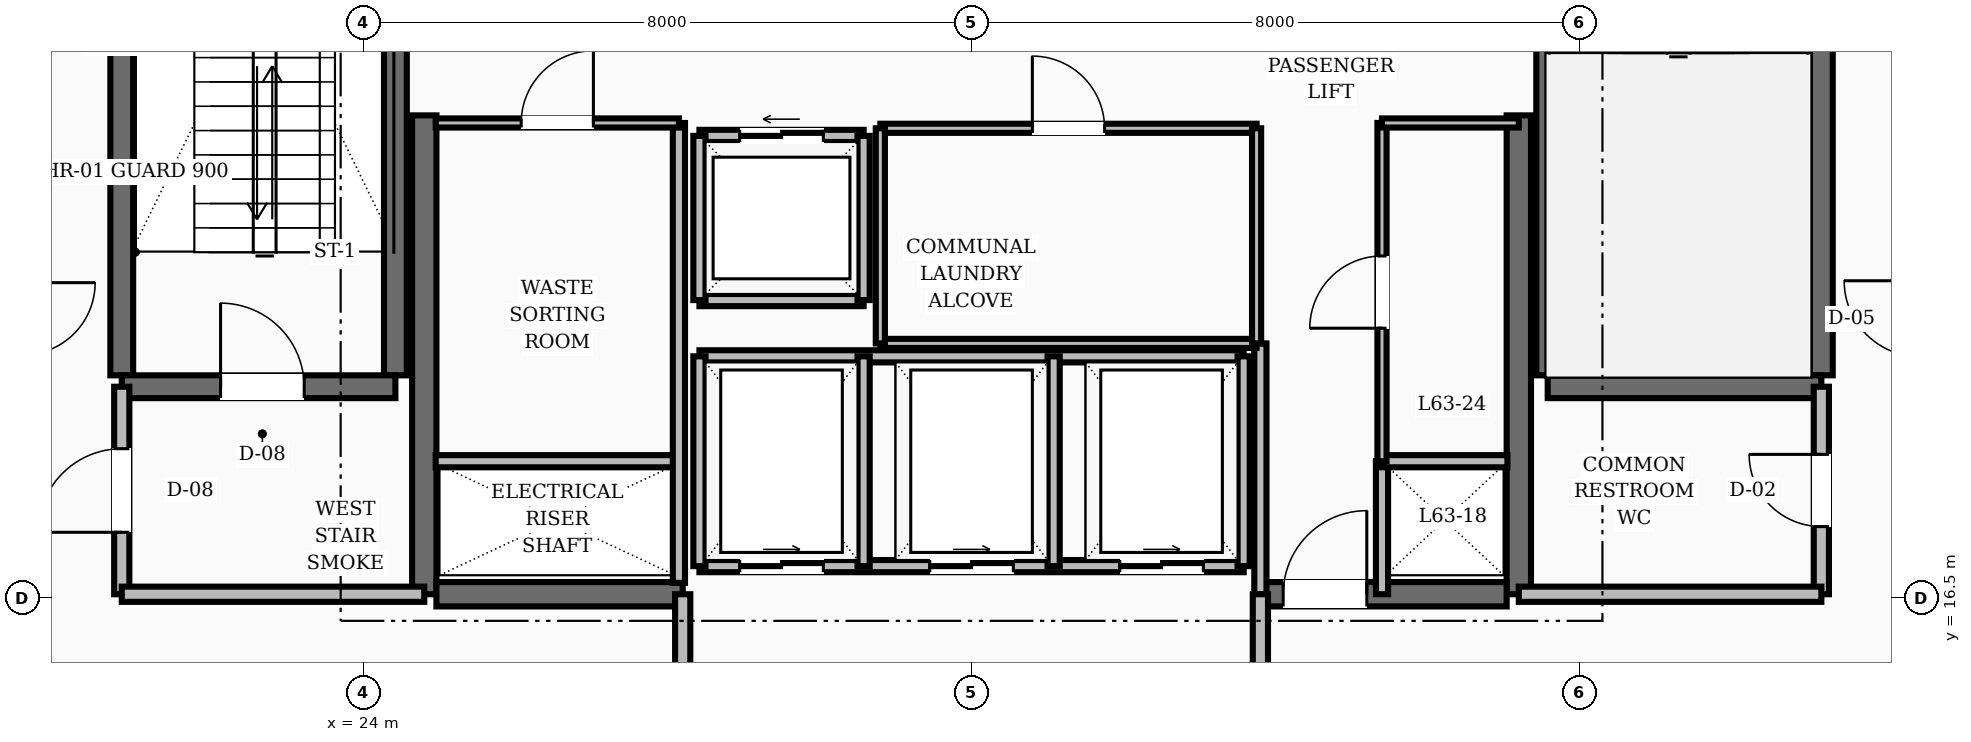
"""IFC4 building model, lengths in metres.
Left out: names, types, materials, properties, quantities, classifications, styles, units other than length and angle.
Written with IfcOpenShell. Run it as: python <this file> out.ifc"""

import sys

from ifc_helpers import new_model, si_unit, direction, frame, frame_2d, origin, place, context, subcontext, project, spatial, rectangle, extrude, element, fill, save


model = new_model("IFC4")
c1 = context("Model", 3, precision=1e-05, world=origin(), true_north=direction((0.0, 1.0)))
c2 = subcontext(c1, "Body", "Model", "MODEL_VIEW")
j1 = project(units=[si_unit("LENGTHUNIT", "METRE"), si_unit("PLANEANGLEUNIT", "RADIAN")], contexts=[c1])
p1 = place(None, origin())
s1 = spatial("IfcSite", under=j1, at=p1, CompositionType="ELEMENT")
p2 = place(p1, origin())
s2 = spatial("IfcBuilding", under=s1, at=p2, CompositionType="ELEMENT")
p3 = place(p2, frame((0.0, 0.0, 243.6)))
s3 = spatial("IfcBuildingStorey", under=s2, at=p3, CompositionType="ELEMENT", Elevation=243.6)
for number, where, z_axis, x_axis in (
    (1, (24.8, 16.55, 0.0), (0.0, 0.0, 1.0), (0.0, 1.0, 0.0)),
    (2, (39.2, 16.55, 0.0), (0.0, 0.0, 1.0), (0.0, 1.0, 0.0)),
):
    element("IfcWall", number, at=place(p3, frame(where, z_axis=z_axis, x_axis=x_axis)), inside=s3, PredefinedType="SHEAR", context=c2, shape_type="SweptSolid", body=[
        extrude(rectangle(XDim=6.3, YDim=0.32, at=frame_2d((3.15, 0.0))), origin(), (0.0, 0.0, 1.0), 3.6),
    ])
p4 = place(p3, frame((24.96, 16.55, 0.0), z_axis=(0.0, 0.0, 1.0), x_axis=(1.0, 0.0, 0.0)))
e3 = element("IfcWall", 3, at=p4, inside=s3, PredefinedType="SHEAR", context=c2, shape_type="SweptSolid", body=[
    extrude(rectangle(XDim=3.24, YDim=0.32, at=frame_2d((1.62, 0.0))), origin(), (0.0, 0.0, 1.0), 3.6),
])
p5 = place(p3, frame((35.8, 16.55, 0.0), z_axis=(0.0, 0.0, 1.0), x_axis=(1.0, 0.0, 0.0)))
e4 = element("IfcWall", 4, at=p5, inside=s3, PredefinedType="SHEAR", context=c2, shape_type="SweptSolid", body=[
    extrude(rectangle(XDim=3.24, YDim=0.32, at=frame_2d((1.62, 0.0))), origin(), (0.0, 0.0, 1.0), 3.6),
])
p6 = place(p5, frame((0.3, 0.0, 0.0)))
e5 = element("IfcOpeningElement", 5, at=p6, cuts=e4, PredefinedType="OPENING", context=c2, shape_type="SweptSolid", body=[
    extrude(rectangle(XDim=1.1, YDim=2.1, at=frame_2d((0.55, 1.05))), frame((0.0, 0.17, 0.0), z_axis=(0.0, -1.0, 0.0), x_axis=(1.0, 0.0, 0.0)), (0.0, 0.0, 1.0), 0.34),
])
for number, where, z_axis, x_axis in (
    (6, (20.82, 19.43, 0.0), (0.0, 0.0, 1.0), (0.0, 1.0, 0.0)),
    (7, (24.42, 19.43, 0.0), (0.0, 0.0, 1.0), (0.0, 1.0, 0.0)),
):
    element("IfcWall", number, at=place(p3, frame(where, z_axis=z_axis, x_axis=x_axis)), inside=s3, PredefinedType="SHEAR", context=c2, shape_type="SweptSolid", body=[
        extrude(rectangle(XDim=8.74, YDim=0.3, at=frame_2d((4.37, 0.0))), origin(), (0.0, 0.0, 1.0), 3.6),
    ])
p7 = place(p3, frame((20.82, 19.28, 0.0), z_axis=(0.0, 0.0, 1.0), x_axis=(1.0, 0.0, 0.0)))
e8 = element("IfcWall", 8, at=p7, inside=s3, PredefinedType="SHEAR", context=c2, shape_type="SweptSolid", body=[
    extrude(rectangle(XDim=3.6, YDim=0.3, at=frame_2d((1.8, 0.0))), origin(), (0.0, 0.0, 1.0), 3.6),
])
p8 = place(p7, frame((1.3, 0.0, 0.0)))
e9 = element("IfcOpeningElement", 9, at=p8, cuts=e8, PredefinedType="OPENING", context=c2, shape_type="SweptSolid", body=[
    extrude(rectangle(XDim=1.1, YDim=2.1, at=frame_2d((0.55, 1.05))), frame((0.0, 0.16, 0.0), z_axis=(0.0, -1.0, 0.0), x_axis=(1.0, 0.0, 0.0)), (0.0, 0.0, 1.0), 0.32),
])
for number, where, z_axis, x_axis in (
    (10, (43.18, 19.43, 0.0), (0.0, 0.0, 1.0), (0.0, 1.0, 0.0)),
    (11, (39.58, 19.43, 0.0), (0.0, 0.0, 1.0), (0.0, 1.0, 0.0)),
):
    element("IfcWall", number, at=place(p3, frame(where, z_axis=z_axis, x_axis=x_axis)), inside=s3, PredefinedType="SHEAR", context=c2, shape_type="SweptSolid", body=[
        extrude(rectangle(XDim=8.74, YDim=0.3, at=frame_2d((4.37, 0.0))), origin(), (0.0, 0.0, 1.0), 3.6),
    ])
p9 = place(p3, frame((39.58, 19.28, 0.0), z_axis=(0.0, 0.0, 1.0), x_axis=(1.0, 0.0, 0.0)))
e12 = element("IfcWall", 12, at=p9, inside=s3, PredefinedType="SHEAR", context=c2, shape_type="SweptSolid", body=[
    extrude(rectangle(XDim=3.6, YDim=0.3, at=frame_2d((1.8, 0.0))), origin(), (0.0, 0.0, 1.0), 3.6),
])
p10 = place(p3, frame((20.82, 16.55, 0.0), z_axis=(0.0, 0.0, 1.0), x_axis=(0.0, 1.0, 0.0)))
e13 = element("IfcWall", 13, at=p10, inside=s3, PredefinedType="SOLIDWALL", context=c2, shape_type="SweptSolid", body=[
    extrude(rectangle(XDim=2.73, YDim=0.2, at=frame_2d((1.365, 0.0))), origin(), (0.0, 0.0, 1.0), 2.87),
])
p11 = place(p10, frame((0.815, 0.0, 0.0)))
e14 = element("IfcOpeningElement", 14, at=p11, cuts=e13, PredefinedType="OPENING", context=c2, shape_type="SweptSolid", body=[
    extrude(rectangle(XDim=1.1, YDim=2.1, at=frame_2d((0.55, 1.05))), frame((0.0, 0.11, 0.0), z_axis=(0.0, -1.0, 0.0), x_axis=(1.0, 0.0, 0.0)), (0.0, 0.0, 1.0), 0.22),
])
p12 = place(p3, frame((20.82, 16.55, 0.0), z_axis=(0.0, 0.0, 1.0), x_axis=(1.0, 0.0, 0.0)))
e15 = element("IfcWall", 15, at=p12, inside=s3, PredefinedType="SOLIDWALL", context=c2, shape_type="SweptSolid", body=[
    extrude(rectangle(XDim=3.98, YDim=0.2, at=frame_2d((1.99, 0.0))), origin(), (0.0, 0.0, 1.0), 2.87),
])
p13 = place(p3, frame((43.18, 16.55, 0.0), z_axis=(0.0, 0.0, 1.0), x_axis=(0.0, 1.0, 0.0)))
e16 = element("IfcWall", 16, at=p13, inside=s3, PredefinedType="SOLIDWALL", context=c2, shape_type="SweptSolid", body=[
    extrude(rectangle(XDim=2.73, YDim=0.2, at=frame_2d((1.365, 0.0))), origin(), (0.0, 0.0, 1.0), 2.87),
])
p14 = place(p13, frame((0.89, 0.0, 0.0)))
e17 = element("IfcOpeningElement", 17, at=p14, cuts=e16, PredefinedType="OPENING", context=c2, shape_type="SweptSolid", body=[
    extrude(rectangle(XDim=0.95, YDim=2.1, at=frame_2d((0.475, 1.05))), frame((0.0, 0.11, 0.0), z_axis=(0.0, -1.0, 0.0), x_axis=(1.0, 0.0, 0.0)), (0.0, 0.0, 1.0), 0.22),
])
p15 = place(p3, frame((39.2, 16.55, 0.0), z_axis=(0.0, 0.0, 1.0), x_axis=(1.0, 0.0, 0.0)))
e18 = element("IfcWall", 18, at=p15, inside=s3, PredefinedType="SOLIDWALL", context=c2, shape_type="SweptSolid", body=[
    extrude(rectangle(XDim=3.98, YDim=0.2, at=frame_2d((1.99, 0.0))), origin(), (0.0, 0.0, 1.0), 2.87),
])
p16 = place(p3, frame((35.8, 16.55, 0.0), z_axis=(0.0, 0.0, 1.0), x_axis=(0.0, 1.0, 0.0)))
e19 = element("IfcWall", 19, at=p16, inside=s3, PredefinedType="SOLIDWALL", context=c2, shape_type="SweptSolid", body=[
    extrude(rectangle(XDim=3.3, YDim=0.16, at=frame_2d((1.65, 0.0))), origin(), (0.0, 0.0, 1.0), 2.87),
])
p17 = place(p3, frame((37.4, 16.55, 0.0), z_axis=(0.0, 0.0, 1.0), x_axis=(0.0, 1.0, 0.0)))
e20 = element("IfcWall", 20, at=p17, inside=s3, PredefinedType="SOLIDWALL", context=c2, shape_type="SweptSolid", body=[
    extrude(rectangle(XDim=1.75, YDim=0.16, at=frame_2d((0.875, 0.0))), origin(), (0.0, 0.0, 1.0), 2.87),
])
for number, where, z_axis, x_axis in (
    (21, (28.2, 14.35, 0.0), (0.0, 0.0, 1.0), (0.0, 1.0, 0.0)),
    (22, (35.8, 14.35, 0.0), (0.0, 0.0, 1.0), (0.0, 1.0, 0.0)),
):
    element("IfcWall", number, at=place(p3, frame(where, z_axis=z_axis, x_axis=x_axis)), inside=s3, PredefinedType="SOLIDWALL", context=c2, shape_type="SweptSolid", body=[
        extrude(rectangle(XDim=2.2, YDim=0.2, at=frame_2d((1.1, 0.0))), origin(), (0.0, 0.0, 1.0), 2.87),
    ])
p18 = place(p3, frame((28.42, 22.58, 0.0), z_axis=(0.0, 0.0, 1.0), x_axis=(1.0, 0.0, 0.0)))
e23 = element("IfcWall", 23, at=p18, inside=s3, PredefinedType="SOLIDWALL", context=c2, shape_type="SweptSolid", body=[
    extrude(rectangle(XDim=2.16, YDim=0.16, at=frame_2d((1.08, 0.0))), origin(), (0.0, 0.0, 1.0), 2.87),
])
p19 = place(p18, frame((0.53, 0.0, 0.0)))
e24 = element("IfcOpeningElement", 24, at=p19, cuts=e23, PredefinedType="OPENING", context=c2, shape_type="SweptSolid", body=[
    extrude(rectangle(XDim=1.1, YDim=2.15, at=frame_2d((0.55, 1.075))), frame((0.0, 0.09, 0.0), z_axis=(0.0, -1.0, 0.0), x_axis=(1.0, 0.0, 0.0)), (0.0, 0.0, 1.0), 0.18),
])
for number, where, z_axis, x_axis in (
    (25, (28.42, 20.42, 0.0), (0.0, 0.0, 1.0), (1.0, 0.0, 0.0)),
    (26, (28.42, 20.42, 0.0), (0.0, 0.0, 1.0), (0.0, 1.0, 0.0)),
    (27, (30.58, 20.42, 0.0), (0.0, 0.0, 1.0), (0.0, 1.0, 0.0)),
):
    element("IfcWall", number, at=place(p3, frame(where, z_axis=z_axis, x_axis=x_axis)), inside=s3, PredefinedType="SOLIDWALL", context=c2, shape_type="SweptSolid", body=[
        extrude(rectangle(XDim=2.16, YDim=0.16, at=frame_2d((1.08, 0.0))), origin(), (0.0, 0.0, 1.0), 2.87),
    ])
p20 = place(p3, frame((28.42, 16.92, 0.0), z_axis=(0.0, 0.0, 1.0), x_axis=(1.0, 0.0, 0.0)))
e28 = element("IfcWall", 28, at=p20, inside=s3, PredefinedType="SOLIDWALL", context=c2, shape_type="SweptSolid", body=[
    extrude(rectangle(XDim=7.16, YDim=0.16, at=frame_2d((3.58, 0.0))), origin(), (0.0, 0.0, 1.0), 2.87),
])
p21 = place(p20, frame((0.53, 0.0, 0.0)))
e29 = element("IfcOpeningElement", 29, at=p21, cuts=e28, PredefinedType="OPENING", context=c2, shape_type="SweptSolid", body=[
    extrude(rectangle(XDim=1.1, YDim=2.15, at=frame_2d((0.55, 1.075))), frame((0.0, 0.09, 0.0), z_axis=(0.0, -1.0, 0.0), x_axis=(1.0, 0.0, 0.0)), (0.0, 0.0, 1.0), 0.18),
])
p22 = place(p20, frame((3.03, 0.0, 0.0)))
e30 = element("IfcOpeningElement", 30, at=p22, cuts=e28, PredefinedType="OPENING", context=c2, shape_type="SweptSolid", body=[
    extrude(rectangle(XDim=1.1, YDim=2.15, at=frame_2d((0.55, 1.075))), frame((0.0, 0.09, 0.0), z_axis=(0.0, -1.0, 0.0), x_axis=(1.0, 0.0, 0.0)), (0.0, 0.0, 1.0), 0.18),
])
p23 = place(p20, frame((5.53, 0.0, 0.0)))
e31 = element("IfcOpeningElement", 31, at=p23, cuts=e28, PredefinedType="OPENING", context=c2, shape_type="SweptSolid", body=[
    extrude(rectangle(XDim=1.1, YDim=2.15, at=frame_2d((0.55, 1.075))), frame((0.0, 0.09, 0.0), z_axis=(0.0, -1.0, 0.0), x_axis=(1.0, 0.0, 0.0)), (0.0, 0.0, 1.0), 0.18),
])
p24 = place(p3, frame((28.42, 19.68, 0.0), z_axis=(0.0, 0.0, 1.0), x_axis=(1.0, 0.0, 0.0)))
e32 = element("IfcWall", 32, at=p24, inside=s3, PredefinedType="SOLIDWALL", context=c2, shape_type="SweptSolid", body=[
    extrude(rectangle(XDim=7.16, YDim=0.16, at=frame_2d((3.58, 0.0))), origin(), (0.0, 0.0, 1.0), 2.87),
])
for number, where, z_axis, x_axis in (
    (33, (28.42, 16.92, 0.0), (0.0, 0.0, 1.0), (0.0, 1.0, 0.0)),
    (34, (30.58, 16.92, 0.0), (0.0, 0.0, 1.0), (0.0, 1.0, 0.0)),
    (35, (33.08, 16.92, 0.0), (0.0, 0.0, 1.0), (0.0, 1.0, 0.0)),
    (36, (35.58, 16.92, 0.0), (0.0, 0.0, 1.0), (0.0, 1.0, 0.0)),
):
    element("IfcWall", number, at=place(p3, frame(where, z_axis=z_axis, x_axis=x_axis)), inside=s3, PredefinedType="SOLIDWALL", context=c2, shape_type="SweptSolid", body=[
        extrude(rectangle(XDim=2.76, YDim=0.16, at=frame_2d((1.38, 0.0))), origin(), (0.0, 0.0, 1.0), 2.87),
    ])
p25 = place(p3, frame((30.8, 22.68, 0.0), z_axis=(0.0, 0.0, 1.0), x_axis=(1.0, 0.0, 0.0)))
e37 = element("IfcWall", 37, at=p25, inside=s3, PredefinedType="PARTITIONING", context=c2, shape_type="SweptSolid", body=[
    extrude(rectangle(XDim=4.95, YDim=0.12, at=frame_2d((2.475, 0.0))), origin(), (0.0, 0.0, 1.0), 2.87),
])
p26 = place(p25, frame((2.0, 0.0, 0.0)))
e38 = element("IfcOpeningElement", 38, at=p26, cuts=e37, PredefinedType="OPENING", context=c2, shape_type="SweptSolid", body=[
    extrude(rectangle(XDim=0.95, YDim=2.1, at=frame_2d((0.475, 1.05))), frame((0.0, 0.07, 0.0), z_axis=(0.0, -1.0, 0.0), x_axis=(1.0, 0.0, 0.0)), (0.0, 0.0, 1.0), 0.14),
])
p27 = place(p3, frame((30.8, 19.85, 0.0), z_axis=(0.0, 0.0, 1.0), x_axis=(1.0, 0.0, 0.0)))
e39 = element("IfcWall", 39, at=p27, inside=s3, PredefinedType="PARTITIONING", context=c2, shape_type="SweptSolid", body=[
    extrude(rectangle(XDim=4.95, YDim=0.12, at=frame_2d((2.475, 0.0))), origin(), (0.0, 0.0, 1.0), 2.87),
])
for number, where, z_axis, x_axis in (
    (40, (30.8, 19.85, 0.0), (0.0, 0.0, 1.0), (0.0, 1.0, 0.0)),
    (41, (35.75, 19.85, 0.0), (0.0, 0.0, 1.0), (0.0, 1.0, 0.0)),
):
    element("IfcWall", number, at=place(p3, frame(where, z_axis=z_axis, x_axis=x_axis)), inside=s3, PredefinedType="PARTITIONING", context=c2, shape_type="SweptSolid", body=[
        extrude(rectangle(XDim=2.83, YDim=0.12, at=frame_2d((1.415, 0.0))), origin(), (0.0, 0.0, 1.0), 2.87),
    ])
p28 = place(p3, frame((24.95, 18.3, 0.0), z_axis=(0.0, 0.0, 1.0), x_axis=(1.0, 0.0, 0.0)))
e42 = element("IfcWall", 42, at=p28, inside=s3, PredefinedType="SOLIDWALL", context=c2, shape_type="SweptSolid", body=[
    extrude(rectangle(XDim=3.2, YDim=0.16, at=frame_2d((1.6, 0.0))), origin(), (0.0, 0.0, 1.0), 2.87),
])
p29 = place(p3, frame((28.15, 16.7, 0.0), z_axis=(0.0, 0.0, 1.0), x_axis=(0.0, 1.0, 0.0)))
e43 = element("IfcWall", 43, at=p29, inside=s3, PredefinedType="SOLIDWALL", context=c2, shape_type="SweptSolid", body=[
    extrude(rectangle(XDim=6.05, YDim=0.16, at=frame_2d((3.025, 0.0))), origin(), (0.0, 0.0, 1.0), 2.87),
])
p30 = place(p3, frame((37.4, 18.3, 0.0), z_axis=(0.0, 0.0, 1.0), x_axis=(1.0, 0.0, 0.0)))
e44 = element("IfcWall", 44, at=p30, inside=s3, PredefinedType="SOLIDWALL", context=c2, shape_type="SweptSolid", body=[
    extrude(rectangle(XDim=1.65, YDim=0.16, at=frame_2d((0.825, 0.0))), origin(), (0.0, 0.0, 1.0), 2.87),
])
p31 = place(p3, frame((24.95, 22.75, 0.0), z_axis=(0.0, 0.0, 1.0), x_axis=(1.0, 0.0, 0.0)))
e45 = element("IfcWall", 45, at=p31, inside=s3, PredefinedType="PARTITIONING", context=c2, shape_type="SweptSolid", body=[
    extrude(rectangle(XDim=3.2, YDim=0.12, at=frame_2d((1.6, 0.0))), origin(), (0.0, 0.0, 1.0), 2.87),
])
p32 = place(p31, frame((1.125, 0.0, 0.0)))
e46 = element("IfcOpeningElement", 46, at=p32, cuts=e45, PredefinedType="OPENING", context=c2, shape_type="SweptSolid", body=[
    extrude(rectangle(XDim=0.95, YDim=2.1, at=frame_2d((0.475, 1.05))), frame((0.0, 0.07, 0.0), z_axis=(0.0, -1.0, 0.0), x_axis=(1.0, 0.0, 0.0)), (0.0, 0.0, 1.0), 0.14),
])
p33 = place(p3, frame((37.4, 18.3, 0.0), z_axis=(0.0, 0.0, 1.0), x_axis=(0.0, 1.0, 0.0)))
e47 = element("IfcWall", 47, at=p33, inside=s3, PredefinedType="PARTITIONING", context=c2, shape_type="SweptSolid", body=[
    extrude(rectangle(XDim=4.45, YDim=0.12, at=frame_2d((2.225, 0.0))), origin(), (0.0, 0.0, 1.0), 2.87),
])
p34 = place(p33, frame((1.75, 0.0, 0.0)))
e48 = element("IfcOpeningElement", 48, at=p34, cuts=e47, PredefinedType="OPENING", context=c2, shape_type="SweptSolid", body=[
    extrude(rectangle(XDim=0.95, YDim=2.1, at=frame_2d((0.475, 1.05))), frame((0.0, 0.07, 0.0), z_axis=(0.0, -1.0, 0.0), x_axis=(1.0, 0.0, 0.0)), (0.0, 0.0, 1.0), 0.14),
])
p35 = place(p3, frame((37.4, 22.75, 0.0), z_axis=(0.0, 0.0, 1.0), x_axis=(1.0, 0.0, 0.0)))
e49 = element("IfcWall", 49, at=p35, inside=s3, PredefinedType="PARTITIONING", context=c2, shape_type="SweptSolid", body=[
    extrude(rectangle(XDim=1.8, YDim=0.12, at=frame_2d((0.9, 0.0))), origin(), (0.0, 0.0, 1.0), 2.87),
])
for number, where, z_axis, x_axis in (
    (50, (19.573, 15.697, 0.0), (0.0, 0.0, 1.0), (0.707, -0.707, 0.0)),
    (51, (42.365, 13.635, 0.0), (0.0, 0.0, 1.0), (0.707, 0.707, 0.0)),
):
    element("IfcWall", number, at=place(p3, frame(where, z_axis=z_axis, x_axis=x_axis)), inside=s3, PredefinedType="SOLIDWALL", context=c2, shape_type="SweptSolid", body=[
        extrude(rectangle(XDim=2.916, YDim=0.16, at=frame_2d((1.458, 0.0))), origin(), (0.0, 0.0, 1.0), 2.87),
    ])
p36 = place(p8, origin())
e52 = element("IfcDoor", 52, at=p36, inside=s3, OperationType="SINGLE_SWING_LEFT", PredefinedType="DOOR", context=c2, shape_type="SweptSolid", body=[
    extrude(rectangle(XDim=1.1, YDim=2.1, at=frame_2d((0.55, 1.05))), frame((0.0, 0.025, 0.0), z_axis=(0.0, -1.0, 0.0), x_axis=(1.0, 0.0, 0.0)), (0.0, 0.0, 1.0), 0.05),
])
fill(e9, e52)
p37 = place(p11, origin())
e53 = element("IfcDoor", 53, at=p37, inside=s3, OperationType="SINGLE_SWING_LEFT", PredefinedType="DOOR", context=c2, shape_type="SweptSolid", body=[
    extrude(rectangle(XDim=1.1, YDim=2.1, at=frame_2d((0.55, 1.05))), frame((0.0, 0.025, 0.0), z_axis=(0.0, -1.0, 0.0), x_axis=(1.0, 0.0, 0.0)), (0.0, 0.0, 1.0), 0.05),
])
fill(e14, e53)
p38 = place(p14, origin())
e54 = element("IfcDoor", 54, at=p38, inside=s3, OperationType="SINGLE_SWING_RIGHT", PredefinedType="DOOR", context=c2, shape_type="SweptSolid", body=[
    extrude(rectangle(XDim=0.95, YDim=2.1, at=frame_2d((0.475, 1.05))), frame((0.0, 0.025, 0.0), z_axis=(0.0, -1.0, 0.0), x_axis=(1.0, 0.0, 0.0)), (0.0, 0.0, 1.0), 0.05),
])
fill(e17, e54)
p39 = place(p6, origin())
e55 = element("IfcDoor", 55, at=p39, inside=s3, OperationType="SINGLE_SWING_RIGHT", PredefinedType="DOOR", context=c2, shape_type="SweptSolid", body=[
    extrude(rectangle(XDim=1.1, YDim=2.1, at=frame_2d((0.55, 1.05))), frame((0.0, 0.025, 0.0), z_axis=(0.0, -1.0, 0.0), x_axis=(1.0, 0.0, 0.0)), (0.0, 0.0, 1.0), 0.05),
])
fill(e5, e55)
p40 = place(p19, origin())
e56 = element("IfcDoor", 56, at=p40, inside=s3, OperationType="SLIDING_TO_LEFT", PredefinedType="DOOR", context=c2, shape_type="SweptSolid", body=[
    extrude(rectangle(XDim=1.1, YDim=2.15, at=frame_2d((0.55, 1.075))), frame((0.0, 0.025, 0.0), z_axis=(0.0, -1.0, 0.0), x_axis=(1.0, 0.0, 0.0)), (0.0, 0.0, 1.0), 0.05),
])
fill(e24, e56)
p41 = place(p21, origin())
e57 = element("IfcDoor", 57, at=p41, inside=s3, OperationType="SLIDING_TO_RIGHT", PredefinedType="DOOR", context=c2, shape_type="SweptSolid", body=[
    extrude(rectangle(XDim=1.1, YDim=2.15, at=frame_2d((0.55, 1.075))), frame((0.0, 0.025, 0.0), z_axis=(0.0, -1.0, 0.0), x_axis=(1.0, 0.0, 0.0)), (0.0, 0.0, 1.0), 0.05),
])
fill(e29, e57)
p42 = place(p22, origin())
e58 = element("IfcDoor", 58, at=p42, inside=s3, OperationType="SLIDING_TO_RIGHT", PredefinedType="DOOR", context=c2, shape_type="SweptSolid", body=[
    extrude(rectangle(XDim=1.1, YDim=2.15, at=frame_2d((0.55, 1.075))), frame((0.0, 0.025, 0.0), z_axis=(0.0, -1.0, 0.0), x_axis=(1.0, 0.0, 0.0)), (0.0, 0.0, 1.0), 0.05),
])
fill(e30, e58)
p43 = place(p23, origin())
e59 = element("IfcDoor", 59, at=p43, inside=s3, OperationType="SLIDING_TO_RIGHT", PredefinedType="DOOR", context=c2, shape_type="SweptSolid", body=[
    extrude(rectangle(XDim=1.1, YDim=2.15, at=frame_2d((0.55, 1.075))), frame((0.0, 0.025, 0.0), z_axis=(0.0, -1.0, 0.0), x_axis=(1.0, 0.0, 0.0)), (0.0, 0.0, 1.0), 0.05),
])
fill(e31, e59)
p44 = place(p26, origin())
e60 = element("IfcDoor", 60, at=p44, inside=s3, OperationType="SINGLE_SWING_LEFT", PredefinedType="DOOR", context=c2, shape_type="SweptSolid", body=[
    extrude(rectangle(XDim=0.95, YDim=2.1, at=frame_2d((0.475, 1.05))), frame((0.0, 0.025, 0.0), z_axis=(0.0, -1.0, 0.0), x_axis=(1.0, 0.0, 0.0)), (0.0, 0.0, 1.0), 0.05),
])
fill(e38, e60)
p45 = place(p32, origin())
e61 = element("IfcDoor", 61, at=p45, inside=s3, OperationType="SINGLE_SWING_RIGHT", PredefinedType="DOOR", context=c2, shape_type="SweptSolid", body=[
    extrude(rectangle(XDim=0.95, YDim=2.1, at=frame_2d((0.475, 1.05))), frame((0.0, 0.025, 0.0), z_axis=(0.0, -1.0, 0.0), x_axis=(1.0, 0.0, 0.0)), (0.0, 0.0, 1.0), 0.05),
])
fill(e46, e61)
p46 = place(p34, origin())
e62 = element("IfcDoor", 62, at=p46, inside=s3, OperationType="SINGLE_SWING_LEFT", PredefinedType="DOOR", context=c2, shape_type="SweptSolid", body=[
    extrude(rectangle(XDim=0.95, YDim=2.1, at=frame_2d((0.475, 1.05))), frame((0.0, 0.025, 0.0), z_axis=(0.0, -1.0, 0.0), x_axis=(1.0, 0.0, 0.0)), (0.0, 0.0, 1.0), 0.05),
])
fill(e48, e62)
save(model, sys.argv[1])
